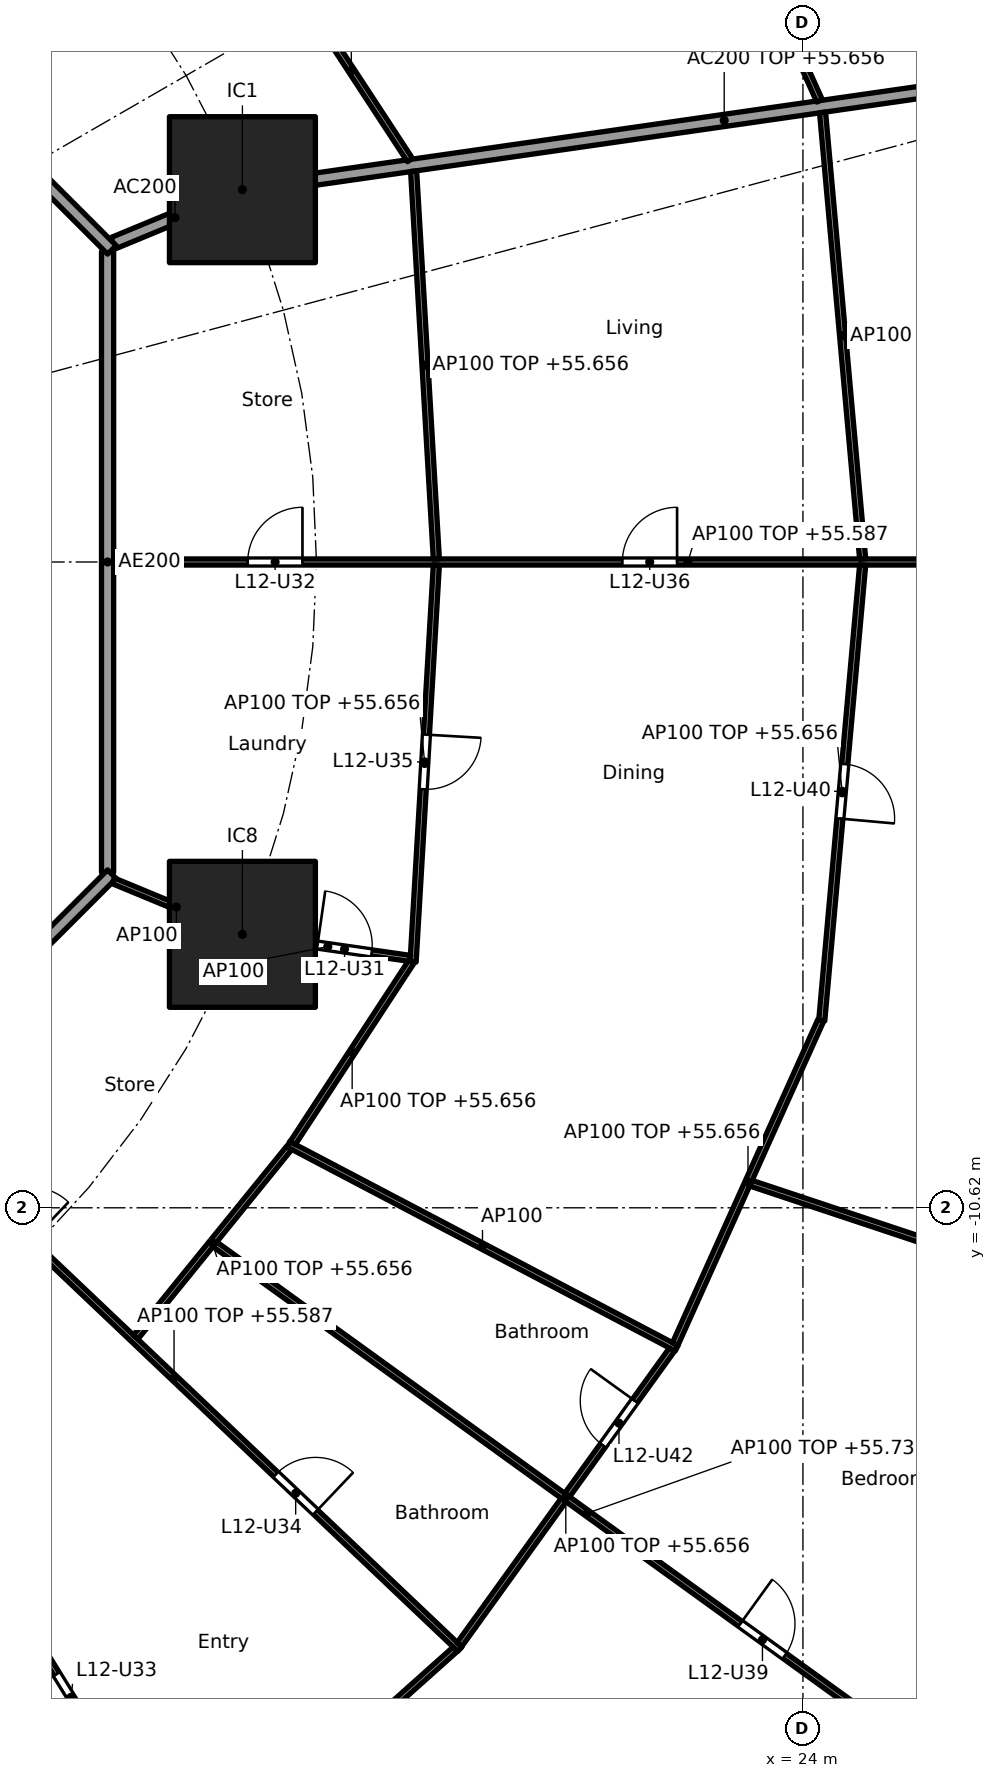
"""IFC4 building model, lengths in metres.
Left out: names, types, materials, properties, quantities, classifications, styles, units other than length and angle.
Written with IfcOpenShell. Run it as: python <this file> out.ifc"""

import sys

from ifc_helpers import new_model, si_unit, direction, frame, frame_2d, origin, origin_2d, place, context, subcontext, project, spatial, rectangle, extrude, element, fill, save


model = new_model("IFC4")
c1 = context("Model", 3, precision=1e-05, world=origin(), true_north=direction((0.0, 1.0)))
c2 = subcontext(c1, "Body", "Model", "MODEL_VIEW")
j1 = project(units=[si_unit("LENGTHUNIT", "METRE"), si_unit("PLANEANGLEUNIT", "RADIAN")], contexts=[c1])
p1 = place(None, origin())
s1 = spatial("IfcSite", under=j1, at=p1, CompositionType="ELEMENT")
p2 = place(p1, origin())
s2 = spatial("IfcBuilding", under=s1, at=p2, CompositionType="ELEMENT")
p3 = place(p2, frame((0.0, 0.0, 52.9)))
s3 = spatial("IfcBuildingStorey", under=s2, at=p3, CompositionType="ELEMENT", Elevation=52.9)
for number, where, z_axis, x_axis in (
    (1, (14.782, 6.123, 0.0), (0.0, 0.0, 1.0), (1.0, 0.0, 0.0)),
    (2, (14.782, -6.123, 0.0), (0.0, 0.0, 1.0), (1.0, 0.0, 0.0)),
):
    element("IfcColumn", number, at=place(p3, frame(where, z_axis=z_axis, x_axis=x_axis)), inside=s3, PredefinedType="COLUMN", context=c2, shape_type="SweptSolid", body=[
        extrude(rectangle(XDim=2.4, YDim=2.4, at=origin_2d()), origin(), (0.0, 0.0, 1.0), 3.7),
    ])
p4 = place(p3, frame((12.657, 5.243, 0.0), z_axis=(0.0, 0.0, 1.0), x_axis=(0.923853160736, 0.382747093259, 0.0)))
e3 = element("IfcWall", 3, at=p4, inside=s3, PredefinedType="PARTITIONING", context=c2, shape_type="SweptSolid", body=[
    extrude(rectangle(XDim=2.2, YDim=0.2, at=frame_2d((1.1, 0.0))), origin(), (0.0, 0.0, 1.0), 3.44),
])
p5 = place(p3, frame((14.832, 6.13, 0.0), z_axis=(0.0, 0.0, 1.0), x_axis=(0.989836541293, 0.142209779978, 0.0)))
e4 = element("IfcWall", 4, at=p5, inside=s3, PredefinedType="PARTITIONING", context=c2, shape_type="SweptSolid", body=[
    extrude(rectangle(XDim=15.909, YDim=0.2, at=frame_2d((7.955, 0.0))), origin(), (0.0, 0.0, 1.0), 2.756),
])
p6 = place(p3, frame((12.565, -5.104, 0.0), z_axis=(0.0, 0.0, 1.0), x_axis=(0.0, 1.0, 0.0)))
e5 = element("IfcWall", 5, at=p6, inside=s3, PredefinedType="PARTITIONING", context=c2, shape_type="SweptSolid", body=[
    extrude(rectangle(XDim=10.209, YDim=0.2, at=frame_2d((5.104, 0.0))), origin(), (0.0, 0.0, 1.0), 3.44),
])
p7 = place(p3, frame((12.635, 5.134, 0.0), z_axis=(0.0, 0.0, 1.0), x_axis=(-0.707106781187, 0.707106781187, 0.0)))
e6 = element("IfcWall", 6, at=p7, inside=s3, PredefinedType="PARTITIONING", context=c2, shape_type="SweptSolid", body=[
    extrude(rectangle(XDim=10.609, YDim=0.2, at=frame_2d((5.305, 0.0))), origin(), (0.0, 0.0, 1.0), 3.44),
])
p8 = place(p3, frame((5.275, -12.494, 0.0), z_axis=(0.0, 0.0, 1.0), x_axis=(0.707106781187, 0.707106781187, 0.0)))
e7 = element("IfcWall", 7, at=p8, inside=s3, PredefinedType="PARTITIONING", context=c2, shape_type="SweptSolid", body=[
    extrude(rectangle(XDim=10.409, YDim=0.2, at=frame_2d((5.205, 0.0))), origin(), (0.0, 0.0, 1.0), 3.44),
])
p9 = place(p8, frame((3.303, 0.0, 0.0)))
e8 = element("IfcOpeningElement", 8, at=p9, cuts=e7, PredefinedType="OPENING", context=c2, shape_type="SweptSolid", body=[
    extrude(rectangle(XDim=1.0, YDim=2.1, at=frame_2d((0.5, 1.05))), frame((0.0, 0.11, 0.0), z_axis=(0.0, -1.0, 0.0), x_axis=(1.0, 0.0, 0.0)), (0.0, 0.0, 1.0), 0.22),
])
p10 = place(p3, frame((12.665, 0.0, 0.0), z_axis=(0.0, 0.0, 1.0), x_axis=(1.0, 0.0, 0.0)))
e9 = element("IfcWall", 9, at=p10, inside=s3, PredefinedType="PARTITIONING", context=c2, shape_type="SweptSolid", body=[
    extrude(rectangle(XDim=18.885, YDim=0.1, at=frame_2d((9.443, 0.0))), origin(), (0.0, 0.0, 1.0), 2.687),
])
p11 = place(p10, frame((2.205, 0.0, 0.0)))
e10 = element("IfcOpeningElement", 10, at=p11, cuts=e9, PredefinedType="OPENING", context=c2, shape_type="SweptSolid", body=[
    extrude(rectangle(XDim=0.9, YDim=2.1, at=frame_2d((0.45, 1.05))), frame((0.0, 0.06, 0.0), z_axis=(0.0, -1.0, 0.0), x_axis=(1.0, 0.0, 0.0)), (0.0, 0.0, 1.0), 0.12),
])
p12 = place(p10, frame((8.366, 0.0, 0.0)))
e11 = element("IfcOpeningElement", 11, at=p12, cuts=e9, PredefinedType="OPENING", context=c2, shape_type="SweptSolid", body=[
    extrude(rectangle(XDim=0.9, YDim=2.1, at=frame_2d((0.45, 1.05))), frame((0.0, 0.06, 0.0), z_axis=(0.0, -1.0, 0.0), x_axis=(1.0, 0.0, 0.0)), (0.0, 0.0, 1.0), 0.12),
])
p13 = place(p10, frame((15.154, 0.0, 0.0)))
e12 = element("IfcOpeningElement", 12, at=p13, cuts=e9, PredefinedType="OPENING", context=c2, shape_type="SweptSolid", body=[
    extrude(rectangle(XDim=0.9, YDim=2.1, at=frame_2d((0.45, 1.05))), frame((0.0, 0.06, 0.0), z_axis=(0.0, -1.0, 0.0), x_axis=(1.0, 0.0, 0.0)), (0.0, 0.0, 1.0), 0.12),
])
p14 = place(p3, frame((17.971, 0.05, 0.0), z_axis=(0.0, 0.0, 1.0), x_axis=(-0.058513659907, 0.998286607946, 0.0)))
e13 = element("IfcWall", 13, at=p14, inside=s3, PredefinedType="PARTITIONING", context=c2, shape_type="SweptSolid", body=[
    extrude(rectangle(XDim=6.388, YDim=0.1, at=frame_2d((3.194, 0.0))), origin(), (0.0, 0.0, 1.0), 2.756),
])
p15 = place(p3, frame((17.971, -0.05, 0.0), z_axis=(0.0, 0.0, 1.0), x_axis=(-0.058476853647, -0.998288764631, 0.0)))
e14 = element("IfcWall", 14, at=p15, inside=s3, PredefinedType="PARTITIONING", context=c2, shape_type="SweptSolid", body=[
    extrude(rectangle(XDim=6.538, YDim=0.1, at=frame_2d((3.269, 0.0))), origin(), (0.0, 0.0, 1.0), 2.756),
])
p16 = place(p15, frame((2.794, 0.0, 0.0)))
e15 = element("IfcOpeningElement", 15, at=p16, cuts=e14, PredefinedType="OPENING", context=c2, shape_type="SweptSolid", body=[
    extrude(rectangle(XDim=0.9, YDim=2.1, at=frame_2d((0.45, 1.05))), frame((0.0, 0.06, 0.0), z_axis=(0.0, -1.0, 0.0), x_axis=(1.0, 0.0, 0.0)), (0.0, 0.0, 1.0), 0.12),
])
p17 = place(p3, frame((24.982, 0.05, 0.0), z_axis=(0.0, 0.0, 1.0), x_axis=(-0.08944290521, 0.995991951126, 0.0)))
e16 = element("IfcWall", 16, at=p17, inside=s3, PredefinedType="PARTITIONING", context=c2, shape_type="SweptSolid", body=[
    extrude(rectangle(XDim=7.373, YDim=0.1, at=frame_2d((3.686, 0.0))), origin(), (0.0, 0.0, 1.0), 2.756),
])
p18 = place(p3, frame((24.982, -0.05, 0.0), z_axis=(0.0, 0.0, 1.0), x_axis=(-0.089444214321, -0.995991833563, 0.0)))
e17 = element("IfcWall", 17, at=p18, inside=s3, PredefinedType="PARTITIONING", context=c2, shape_type="SweptSolid", body=[
    extrude(rectangle(XDim=7.523, YDim=0.1, at=frame_2d((3.761, 0.0))), origin(), (0.0, 0.0, 1.0), 2.756),
])
p19 = place(p18, frame((3.286, 0.0, 0.0)))
e18 = element("IfcOpeningElement", 18, at=p19, cuts=e17, PredefinedType="OPENING", context=c2, shape_type="SweptSolid", body=[
    extrude(rectangle(XDim=0.9, YDim=2.1, at=frame_2d((0.45, 1.05))), frame((0.0, 0.06, 0.0), z_axis=(0.0, -1.0, 0.0), x_axis=(1.0, 0.0, 0.0)), (0.0, 0.0, 1.0), 0.12),
])
p20 = place(p3, frame((17.537, 6.61, 0.0), z_axis=(0.0, 0.0, 1.0), x_axis=(-0.547637987196, 0.836715384692, 0.0)))
e19 = element("IfcWall", 19, at=p20, inside=s3, PredefinedType="PARTITIONING", context=c2, shape_type="SweptSolid", body=[
    extrude(rectangle(XDim=3.52, YDim=0.1, at=frame_2d((1.76, 0.0))), origin(), (0.0, 0.0, 1.0), 2.756),
])
p21 = place(p3, frame((24.273, 7.584, 0.0), z_axis=(0.0, 0.0, 1.0), x_axis=(-0.410201529109, 0.911994904326, 0.0)))
e20 = element("IfcWall", 20, at=p21, inside=s3, PredefinedType="PARTITIONING", context=c2, shape_type="SweptSolid", body=[
    extrude(rectangle(XDim=5.787, YDim=0.1, at=frame_2d((2.894, 0.0))), origin(), (0.0, 0.0, 1.0), 2.756),
])
p22 = place(p3, frame((7.097, -10.81, 0.0), z_axis=(0.0, 0.0, 1.0), x_axis=(0.526453266471, -0.850204068576, 0.0)))
e21 = element("IfcWall", 21, at=p22, inside=s3, PredefinedType="PARTITIONING", context=c2, shape_type="SweptSolid", body=[
    extrude(rectangle(XDim=19.85, YDim=0.1, at=frame_2d((9.925, 0.0))), origin(), (0.0, 0.0, 1.0), 2.687),
])
p23 = place(p22, frame((0.35, 0.0, 0.0)))
e22 = element("IfcOpeningElement", 22, at=p23, cuts=e21, PredefinedType="OPENING", context=c2, shape_type="SweptSolid", body=[
    extrude(rectangle(XDim=0.9, YDim=2.1, at=frame_2d((0.45, 1.05))), frame((0.0, 0.06, 0.0), z_axis=(0.0, -1.0, 0.0), x_axis=(1.0, 0.0, 0.0)), (0.0, 0.0, 1.0), 0.12),
])
p24 = place(p22, frame((8.795, 0.0, 0.0)))
e23 = element("IfcOpeningElement", 23, at=p24, cuts=e21, PredefinedType="OPENING", context=c2, shape_type="SweptSolid", body=[
    extrude(rectangle(XDim=0.9, YDim=2.1, at=frame_2d((0.45, 1.05))), frame((0.0, 0.06, 0.0), z_axis=(0.0, -1.0, 0.0), x_axis=(1.0, 0.0, 0.0)), (0.0, 0.0, 1.0), 0.12),
])
p25 = place(p3, frame((13.936, -21.761, 0.0), z_axis=(0.0, 0.0, 1.0), x_axis=(0.745806142791, 0.666163041136, 0.0)))
e24 = element("IfcWall", 24, at=p25, inside=s3, PredefinedType="PARTITIONING", context=c2, shape_type="SweptSolid", body=[
    extrude(rectangle(XDim=5.831, YDim=0.1, at=frame_2d((2.915, 0.0))), origin(), (0.0, 0.0, 1.0), 2.756),
])
p26 = place(p25, frame((2.465, 0.0, 0.0)))
e25 = element("IfcOpeningElement", 25, at=p26, cuts=e24, PredefinedType="OPENING", context=c2, shape_type="SweptSolid", body=[
    extrude(rectangle(XDim=0.9, YDim=2.1, at=frame_2d((0.45, 1.05))), frame((0.0, 0.06, 0.0), z_axis=(0.0, -1.0, 0.0), x_axis=(1.0, 0.0, 0.0)), (0.0, 0.0, 1.0), 0.12),
])
p27 = place(p3, frame((8.957, -8.953, 0.0), z_axis=(0.0, 0.0, 1.0), x_axis=(0.725250022034, -0.688485588476, 0.0)))
e26 = element("IfcWall", 26, at=p27, inside=s3, PredefinedType="PARTITIONING", context=c2, shape_type="SweptSolid", body=[
    extrude(rectangle(XDim=12.963, YDim=0.1, at=frame_2d((6.481, 0.0))), origin(), (0.0, 0.0, 1.0), 2.687),
])
p28 = place(p27, frame((2.333, 0.0, 0.0)))
e27 = element("IfcOpeningElement", 27, at=p28, cuts=e26, PredefinedType="OPENING", context=c2, shape_type="SweptSolid", body=[
    extrude(rectangle(XDim=0.9, YDim=2.1, at=frame_2d((0.45, 1.05))), frame((0.0, 0.06, 0.0), z_axis=(0.0, -1.0, 0.0), x_axis=(1.0, 0.0, 0.0)), (0.0, 0.0, 1.0), 0.12),
])
p29 = place(p27, frame((8.79, 0.0, 0.0)))
e28 = element("IfcOpeningElement", 28, at=p29, cuts=e26, PredefinedType="OPENING", context=c2, shape_type="SweptSolid", body=[
    extrude(rectangle(XDim=0.9, YDim=2.1, at=frame_2d((0.45, 1.05))), frame((0.0, 0.06, 0.0), z_axis=(0.0, -1.0, 0.0), x_axis=(1.0, 0.0, 0.0)), (0.0, 0.0, 1.0), 0.12),
])
p30 = place(p3, frame((13.026, -12.747, 0.0), z_axis=(0.0, 0.0, 1.0), x_axis=(0.630126826288, 0.776492229705, 0.0)))
e29 = element("IfcWall", 29, at=p30, inside=s3, PredefinedType="PARTITIONING", context=c2, shape_type="SweptSolid", body=[
    extrude(rectangle(XDim=4.007, YDim=0.1, at=frame_2d((2.003, 0.0))), origin(), (0.0, 0.0, 1.0), 2.756),
])
p31 = place(p3, frame((18.351, -17.803, 0.0), z_axis=(0.0, 0.0, 1.0), x_axis=(0.584563700282, 0.811347817099, 0.0)))
e30 = element("IfcWall", 30, at=p31, inside=s3, PredefinedType="PARTITIONING", context=c2, shape_type="SweptSolid", body=[
    extrude(rectangle(XDim=5.984, YDim=0.1, at=frame_2d((2.992, 0.0))), origin(), (0.0, 0.0, 1.0), 2.756),
])
p32 = place(p31, frame((4.038, 0.0, 0.0)))
e31 = element("IfcOpeningElement", 31, at=p32, cuts=e30, PredefinedType="OPENING", context=c2, shape_type="SweptSolid", body=[
    extrude(rectangle(XDim=0.9, YDim=2.1, at=frame_2d((0.45, 1.05))), frame((0.0, 0.06, 0.0), z_axis=(0.0, -1.0, 0.0), x_axis=(1.0, 0.0, 0.0)), (0.0, 0.0, 1.0), 0.12),
])
p33 = place(p3, frame((14.329, -11.221, 0.0), z_axis=(0.0, 0.0, 1.0), x_axis=(0.810671130917, -0.58550176558, 0.0)))
e32 = element("IfcWall", 32, at=p33, inside=s3, PredefinedType="PARTITIONING", context=c2, shape_type="SweptSolid", body=[
    extrude(rectangle(XDim=15.106, YDim=0.1, at=frame_2d((7.553, 0.0))), origin(), (0.0, 0.0, 1.0), 2.837),
])
p34 = place(p33, frame((10.659, 0.0, 0.0)))
e33 = element("IfcOpeningElement", 33, at=p34, cuts=e32, PredefinedType="OPENING", context=c2, shape_type="SweptSolid", body=[
    extrude(rectangle(XDim=0.9, YDim=2.1, at=frame_2d((0.45, 1.05))), frame((0.0, 0.06, 0.0), z_axis=(0.0, -1.0, 0.0), x_axis=(1.0, 0.0, 0.0)), (0.0, 0.0, 1.0), 0.12),
])
p35 = place(p3, frame((15.538, -9.574, 0.0), z_axis=(0.0, 0.0, 1.0), x_axis=(0.88517945493, -0.465249752895, 0.0)))
e34 = element("IfcWall", 34, at=p35, inside=s3, PredefinedType="PARTITIONING", context=c2, shape_type="SweptSolid", body=[
    extrude(rectangle(XDim=7.213, YDim=0.1, at=frame_2d((3.606, 0.0))), origin(), (0.0, 0.0, 1.0), 3.44),
])
p36 = place(p3, frame((15.609, -9.556, 0.0), z_axis=(0.0, 0.0, 1.0), x_axis=(0.547641765292, 0.836712911881, 0.0)))
e35 = element("IfcWall", 35, at=p36, inside=s3, PredefinedType="PARTITIONING", context=c2, shape_type="SweptSolid", body=[
    extrude(rectangle(XDim=3.57, YDim=0.1, at=frame_2d((1.785, 0.0))), origin(), (0.0, 0.0, 1.0), 2.756),
])
p37 = place(p3, frame((21.899, -12.861, 0.0), z_axis=(0.0, 0.0, 1.0), x_axis=(0.410197710154, 0.911996622025, 0.0)))
e36 = element("IfcWall", 36, at=p37, inside=s3, PredefinedType="PARTITIONING", context=c2, shape_type="SweptSolid", body=[
    extrude(rectangle(XDim=5.837, YDim=0.1, at=frame_2d((2.918, 0.0))), origin(), (0.0, 0.0, 1.0), 2.756),
])
p38 = place(p3, frame((23.144, -10.216, 0.0), z_axis=(0.0, 0.0, 1.0), x_axis=(0.948811715359, -0.315842253027, 0.0)))
e37 = element("IfcWall", 37, at=p38, inside=s3, PredefinedType="PARTITIONING", context=c2, shape_type="SweptSolid", body=[
    extrude(rectangle(XDim=7.6, YDim=0.1, at=frame_2d((3.8, 0.0))), origin(), (0.0, 0.0, 1.0), 2.837),
])
p39 = place(p3, frame((12.657, -5.243, 0.0), z_axis=(0.0, 0.0, 1.0), x_axis=(0.923864733477, -0.382719158442, 0.0)))
e38 = element("IfcWall", 38, at=p39, inside=s3, PredefinedType="PARTITIONING", context=c2, shape_type="SweptSolid", body=[
    extrude(rectangle(XDim=2.25, YDim=0.1, at=frame_2d((1.125, 0.0))), origin(), (0.0, 0.0, 1.0), 3.44),
])
p40 = place(p3, frame((14.832, -6.13, 0.0), z_axis=(0.0, 0.0, 1.0), x_axis=(0.989840446863, -0.142182593007, 0.0)))
e39 = element("IfcWall", 39, at=p40, inside=s3, PredefinedType="PARTITIONING", context=c2, shape_type="SweptSolid", body=[
    extrude(rectangle(XDim=2.739, YDim=0.1, at=frame_2d((1.369, 0.0))), origin(), (0.0, 0.0, 1.0), 3.44),
])
p41 = place(p40, frame((1.197, 0.0, 0.0)))
e40 = element("IfcOpeningElement", 40, at=p41, cuts=e39, PredefinedType="OPENING", context=c2, shape_type="SweptSolid", body=[
    extrude(rectangle(XDim=0.9, YDim=2.1, at=frame_2d((0.45, 1.05))), frame((0.0, 0.06, 0.0), z_axis=(0.0, -1.0, 0.0), x_axis=(1.0, 0.0, 0.0)), (0.0, 0.0, 1.0), 0.12),
])
p42 = place(p41, origin())
e41 = element("IfcDoor", 41, at=p42, inside=s3, OperationType="SINGLE_SWING_LEFT", PredefinedType="DOOR", context=c2, shape_type="SweptSolid", body=[
    extrude(rectangle(XDim=0.9, YDim=2.1, at=frame_2d((0.45, 1.05))), frame((0.0, 0.025, 0.0), z_axis=(0.0, -1.0, 0.0), x_axis=(1.0, 0.0, 0.0)), (0.0, 0.0, 1.0), 0.05),
])
fill(e40, e41)
p43 = place(p11, origin())
e42 = element("IfcDoor", 42, at=p43, inside=s3, OperationType="SINGLE_SWING_RIGHT", PredefinedType="DOOR", context=c2, shape_type="SweptSolid", body=[
    extrude(rectangle(XDim=0.9, YDim=2.1, at=frame_2d((0.45, 1.05))), frame((0.0, 0.025, 0.0), z_axis=(0.0, -1.0, 0.0), x_axis=(1.0, 0.0, 0.0)), (0.0, 0.0, 1.0), 0.05),
])
fill(e10, e42)
p44 = place(p24, frame((0.9, 0.0, 0.0), x_axis=(-1.0, 0.0, 0.0)))
e43 = element("IfcDoor", 43, at=p44, inside=s3, OperationType="SINGLE_SWING_RIGHT", PredefinedType="DOOR", context=c2, shape_type="SweptSolid", body=[
    extrude(rectangle(XDim=0.9, YDim=2.1, at=frame_2d((0.45, 1.05))), frame((0.0, 0.025, 0.0), z_axis=(0.0, -1.0, 0.0), x_axis=(1.0, 0.0, 0.0)), (0.0, 0.0, 1.0), 0.05),
])
fill(e23, e43)
p45 = place(p29, origin())
e44 = element("IfcDoor", 44, at=p45, inside=s3, OperationType="SINGLE_SWING_RIGHT", PredefinedType="DOOR", context=c2, shape_type="SweptSolid", body=[
    extrude(rectangle(XDim=0.9, YDim=2.1, at=frame_2d((0.45, 1.05))), frame((0.0, 0.025, 0.0), z_axis=(0.0, -1.0, 0.0), x_axis=(1.0, 0.0, 0.0)), (0.0, 0.0, 1.0), 0.05),
])
fill(e28, e44)
p46 = place(p16, origin())
e45 = element("IfcDoor", 45, at=p46, inside=s3, OperationType="SINGLE_SWING_LEFT", PredefinedType="DOOR", context=c2, shape_type="SweptSolid", body=[
    extrude(rectangle(XDim=0.9, YDim=2.1, at=frame_2d((0.45, 1.05))), frame((0.0, 0.025, 0.0), z_axis=(0.0, -1.0, 0.0), x_axis=(1.0, 0.0, 0.0)), (0.0, 0.0, 1.0), 0.05),
])
fill(e15, e45)
p47 = place(p12, origin())
e46 = element("IfcDoor", 46, at=p47, inside=s3, OperationType="SINGLE_SWING_RIGHT", PredefinedType="DOOR", context=c2, shape_type="SweptSolid", body=[
    extrude(rectangle(XDim=0.9, YDim=2.1, at=frame_2d((0.45, 1.05))), frame((0.0, 0.025, 0.0), z_axis=(0.0, -1.0, 0.0), x_axis=(1.0, 0.0, 0.0)), (0.0, 0.0, 1.0), 0.05),
])
fill(e11, e46)
p48 = place(p34, origin())
e47 = element("IfcDoor", 47, at=p48, inside=s3, OperationType="SINGLE_SWING_LEFT", PredefinedType="DOOR", context=c2, shape_type="SweptSolid", body=[
    extrude(rectangle(XDim=0.9, YDim=2.1, at=frame_2d((0.45, 1.05))), frame((0.0, 0.025, 0.0), z_axis=(0.0, -1.0, 0.0), x_axis=(1.0, 0.0, 0.0)), (0.0, 0.0, 1.0), 0.05),
])
fill(e33, e47)
p49 = place(p19, origin())
e48 = element("IfcDoor", 48, at=p49, inside=s3, OperationType="SINGLE_SWING_RIGHT", PredefinedType="DOOR", context=c2, shape_type="SweptSolid", body=[
    extrude(rectangle(XDim=0.9, YDim=2.1, at=frame_2d((0.45, 1.05))), frame((0.0, 0.025, 0.0), z_axis=(0.0, -1.0, 0.0), x_axis=(1.0, 0.0, 0.0)), (0.0, 0.0, 1.0), 0.05),
])
fill(e18, e48)
p50 = place(p32, origin())
e49 = element("IfcDoor", 49, at=p50, inside=s3, OperationType="SINGLE_SWING_RIGHT", PredefinedType="DOOR", context=c2, shape_type="SweptSolid", body=[
    extrude(rectangle(XDim=0.9, YDim=2.1, at=frame_2d((0.45, 1.05))), frame((0.0, 0.025, 0.0), z_axis=(0.0, -1.0, 0.0), x_axis=(1.0, 0.0, 0.0)), (0.0, 0.0, 1.0), 0.05),
])
fill(e31, e49)
save(model, sys.argv[1])
